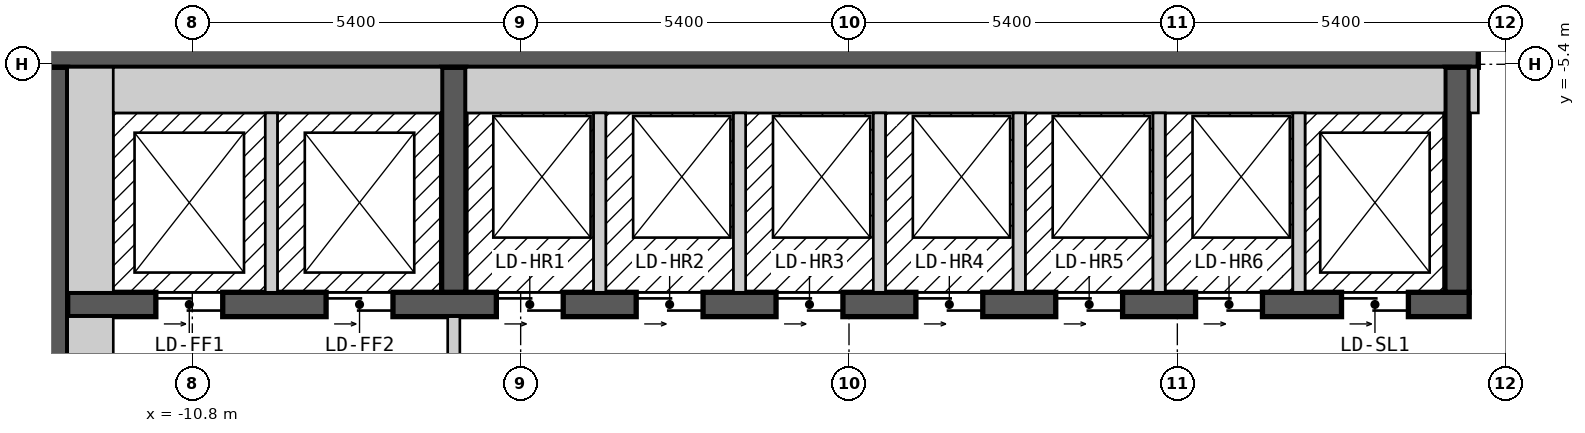
"""IFC4 building model, lengths in metres.
Left out: names, types, materials, properties, quantities, classifications, styles, units other than length and angle.
Written with IfcOpenShell. Run it as: python <this file> out.ifc"""

import sys

from ifc_helpers import new_model, si_unit, direction, frame, frame_2d, origin, place, context, subcontext, project, spatial, rectangle, extrude, element, fill, save


model = new_model("IFC4")
c1 = context("Model", 3, precision=1e-05, world=origin(), true_north=direction((0.0, 1.0)))
c2 = subcontext(c1, "Body", "Model", "MODEL_VIEW")
j1 = project(units=[si_unit("LENGTHUNIT", "METRE"), si_unit("PLANEANGLEUNIT", "RADIAN")], contexts=[c1])
p1 = place(None, origin())
s1 = spatial("IfcSite", under=j1, at=p1, CompositionType="ELEMENT")
p2 = place(p1, origin())
s2 = spatial("IfcBuilding", under=s1, at=p2, CompositionType="ELEMENT")
p3 = place(p2, frame((0.0, 0.0, 202.8)))
s3 = spatial("IfcBuildingStorey", under=s2, at=p3, CompositionType="ELEMENT", Elevation=202.8)
p4 = place(p3, frame((-13.3, -5.225, 0.0), z_axis=(0.0, 0.0, 1.0), x_axis=(1.0, 0.0, 0.0)))
e1 = element("IfcWall", 1, at=p4, inside=s3, PredefinedType="SHEAR", context=c2, shape_type="SweptSolid", body=[
    extrude(rectangle(XDim=26.6, YDim=0.45, at=frame_2d((13.3, 0.0))), origin(), (0.0, 0.0, 1.0), 2.7),
])
p5 = place(p4, frame((23.65, 0.0, 0.0)))
e2 = element("IfcOpeningElement", 2, at=p5, cuts=e1, PredefinedType="OPENING", context=c2, shape_type="SweptSolid", body=[
    extrude(rectangle(XDim=1.2, YDim=2.1, at=frame_2d((0.6, 1.05))), frame((0.0, 0.235, 0.0), z_axis=(0.0, -1.0, 0.0), x_axis=(1.0, 0.0, 0.0)), (0.0, 0.0, 1.0), 0.47),
])
p6 = place(p3, frame((-13.075, -18.55, 0.0), z_axis=(0.0, 0.0, 1.0), x_axis=(0.0, 1.0, 0.0)))
e3 = element("IfcWall", 3, at=p6, inside=s3, PredefinedType="SHEAR", context=c2, shape_type="SweptSolid", body=[
    extrude(rectangle(XDim=13.1, YDim=0.45, at=frame_2d((6.55, 0.0))), origin(), (0.0, 0.0, 1.0), 2.7),
])
p7 = place(p6, frame((4.35, 0.0, 0.0)))
e4 = element("IfcOpeningElement", 4, at=p7, cuts=e3, PredefinedType="OPENING", context=c2, shape_type="SweptSolid", body=[
    extrude(rectangle(XDim=1.2, YDim=2.1, at=frame_2d((0.6, 1.05))), frame((0.0, 0.235, 0.0), z_axis=(0.0, -1.0, 0.0), x_axis=(1.0, 0.0, 0.0)), (0.0, 0.0, 1.0), 0.47),
])
p8 = place(p3, frame((-12.85, -9.35, 0.0), z_axis=(0.0, 0.0, 1.0), x_axis=(1.0, 0.0, 0.0)))
e5 = element("IfcWall", 5, at=p8, inside=s3, PredefinedType="SHEAR", context=c2, shape_type="SweptSolid", body=[
    extrude(rectangle(XDim=23.05, YDim=0.4, at=frame_2d((11.525, 0.0))), origin(), (0.0, 0.0, 1.0), 2.7),
])
p9 = place(p8, frame((1.45, 0.0, 0.0)))
e6 = element("IfcOpeningElement", 6, at=p9, cuts=e5, PredefinedType="OPENING", context=c2, shape_type="SweptSolid", body=[
    extrude(rectangle(XDim=1.1, YDim=2.1, at=frame_2d((0.55, 1.05))), frame((0.0, 0.21, 0.0), z_axis=(0.0, -1.0, 0.0), x_axis=(1.0, 0.0, 0.0)), (0.0, 0.0, 1.0), 0.42),
])
p10 = place(p8, frame((4.25, 0.0, 0.0)))
e7 = element("IfcOpeningElement", 7, at=p10, cuts=e5, PredefinedType="OPENING", context=c2, shape_type="SweptSolid", body=[
    extrude(rectangle(XDim=1.1, YDim=2.1, at=frame_2d((0.55, 1.05))), frame((0.0, 0.21, 0.0), z_axis=(0.0, -1.0, 0.0), x_axis=(1.0, 0.0, 0.0)), (0.0, 0.0, 1.0), 0.42),
])
p11 = place(p8, frame((7.05, 0.0, 0.0)))
e8 = element("IfcOpeningElement", 8, at=p11, cuts=e5, PredefinedType="OPENING", context=c2, shape_type="SweptSolid", body=[
    extrude(rectangle(XDim=1.1, YDim=2.1, at=frame_2d((0.55, 1.05))), frame((0.0, 0.21, 0.0), z_axis=(0.0, -1.0, 0.0), x_axis=(1.0, 0.0, 0.0)), (0.0, 0.0, 1.0), 0.42),
])
p12 = place(p8, frame((9.35, 0.0, 0.0)))
e9 = element("IfcOpeningElement", 9, at=p12, cuts=e5, PredefinedType="OPENING", context=c2, shape_type="SweptSolid", body=[
    extrude(rectangle(XDim=1.1, YDim=2.1, at=frame_2d((0.55, 1.05))), frame((0.0, 0.21, 0.0), z_axis=(0.0, -1.0, 0.0), x_axis=(1.0, 0.0, 0.0)), (0.0, 0.0, 1.0), 0.42),
])
p13 = place(p8, frame((11.65, 0.0, 0.0)))
e10 = element("IfcOpeningElement", 10, at=p13, cuts=e5, PredefinedType="OPENING", context=c2, shape_type="SweptSolid", body=[
    extrude(rectangle(XDim=1.1, YDim=2.1, at=frame_2d((0.55, 1.05))), frame((0.0, 0.21, 0.0), z_axis=(0.0, -1.0, 0.0), x_axis=(1.0, 0.0, 0.0)), (0.0, 0.0, 1.0), 0.42),
])
p14 = place(p8, frame((13.95, 0.0, 0.0)))
e11 = element("IfcOpeningElement", 11, at=p14, cuts=e5, PredefinedType="OPENING", context=c2, shape_type="SweptSolid", body=[
    extrude(rectangle(XDim=1.1, YDim=2.1, at=frame_2d((0.55, 1.05))), frame((0.0, 0.21, 0.0), z_axis=(0.0, -1.0, 0.0), x_axis=(1.0, 0.0, 0.0)), (0.0, 0.0, 1.0), 0.42),
])
p15 = place(p8, frame((16.25, 0.0, 0.0)))
e12 = element("IfcOpeningElement", 12, at=p15, cuts=e5, PredefinedType="OPENING", context=c2, shape_type="SweptSolid", body=[
    extrude(rectangle(XDim=1.1, YDim=2.1, at=frame_2d((0.55, 1.05))), frame((0.0, 0.21, 0.0), z_axis=(0.0, -1.0, 0.0), x_axis=(1.0, 0.0, 0.0)), (0.0, 0.0, 1.0), 0.42),
])
p16 = place(p8, frame((18.55, 0.0, 0.0)))
e13 = element("IfcOpeningElement", 13, at=p16, cuts=e5, PredefinedType="OPENING", context=c2, shape_type="SweptSolid", body=[
    extrude(rectangle(XDim=1.1, YDim=2.1, at=frame_2d((0.55, 1.05))), frame((0.0, 0.21, 0.0), z_axis=(0.0, -1.0, 0.0), x_axis=(1.0, 0.0, 0.0)), (0.0, 0.0, 1.0), 0.42),
])
p17 = place(p8, frame((20.95, 0.0, 0.0)))
e14 = element("IfcOpeningElement", 14, at=p17, cuts=e5, PredefinedType="OPENING", context=c2, shape_type="SweptSolid", body=[
    extrude(rectangle(XDim=1.1, YDim=2.1, at=frame_2d((0.55, 1.05))), frame((0.0, 0.21, 0.0), z_axis=(0.0, -1.0, 0.0), x_axis=(1.0, 0.0, 0.0)), (0.0, 0.0, 1.0), 0.42),
])
for number, where, z_axis, x_axis in (
    (15, (-6.5, -9.15, 0.0), (0.0, 0.0, 1.0), (0.0, 1.0, 0.0)),
    (16, (10.0, -9.15, 0.0), (0.0, 0.0, 1.0), (0.0, 1.0, 0.0)),
):
    element("IfcWall", number, at=place(p3, frame(where, z_axis=z_axis, x_axis=x_axis)), inside=s3, PredefinedType="SHEAR", context=c2, shape_type="SweptSolid", body=[
        extrude(rectangle(XDim=3.7, YDim=0.4, at=frame_2d((1.85, 0.0))), origin(), (0.0, 0.0, 1.0), 2.7),
    ])
p18 = place(p3, frame((-12.475, -13.0, 0.0), z_axis=(0.0, 0.0, 1.0), x_axis=(0.0, 1.0, 0.0)))
e17 = element("IfcWall", 17, at=p18, inside=s3, PredefinedType="PARTITIONING", context=c2, shape_type="SweptSolid", body=[
    extrude(rectangle(XDim=3.45, YDim=0.75, at=frame_2d((1.725, 0.0))), origin(), (0.0, 0.0, 1.0), 2.7),
])
p19 = place(p3, frame((-12.475, -9.15, 0.0), z_axis=(0.0, 0.0, 1.0), x_axis=(0.0, 1.0, 0.0)))
e18 = element("IfcWall", 18, at=p19, inside=s3, PredefinedType="SOLIDWALL", context=c2, shape_type="SweptSolid", body=[
    extrude(rectangle(XDim=3.7, YDim=0.75, at=frame_2d((1.85, 0.0))), origin(), (0.0, 0.0, 1.0), 2.7),
])
p20 = place(p3, frame((-12.1, -5.825, 0.0), z_axis=(0.0, 0.0, 1.0), x_axis=(1.0, 0.0, 0.0)))
e19 = element("IfcWall", 19, at=p20, inside=s3, PredefinedType="SOLIDWALL", context=c2, shape_type="SweptSolid", body=[
    extrude(rectangle(XDim=5.4, YDim=0.75, at=frame_2d((2.7, 0.0))), origin(), (0.0, 0.0, 1.0), 2.7),
])
p21 = place(p3, frame((-9.5, -9.15, 0.0), z_axis=(0.0, 0.0, 1.0), x_axis=(0.0, 1.0, 0.0)))
e20 = element("IfcWall", 20, at=p21, inside=s3, PredefinedType="SOLIDWALL", context=c2, shape_type="SweptSolid", body=[
    extrude(rectangle(XDim=2.95, YDim=0.2, at=frame_2d((1.475, 0.0))), origin(), (0.0, 0.0, 1.0), 2.7),
])
p22 = place(p3, frame((-6.5, -14.45, 0.0), z_axis=(0.0, 0.0, 1.0), x_axis=(0.0, 1.0, 0.0)))
e21 = element("IfcWall", 21, at=p22, inside=s3, PredefinedType="PARTITIONING", context=c2, shape_type="SweptSolid", body=[
    extrude(rectangle(XDim=4.9, YDim=0.2, at=frame_2d((2.45, 0.0))), origin(), (0.0, 0.0, 1.0), 2.7),
])
p23 = place(p22, frame((3.15, 0.0, 0.0), z_axis=(0.0, 0.0, 1.0), x_axis=(-1.0, 0.0, 0.0)))
e22 = element("IfcOpeningElement", 22, at=p23, cuts=e21, PredefinedType="OPENING", context=c2, shape_type="SweptSolid", body=[
    extrude(rectangle(XDim=1.4, YDim=2.1, at=frame_2d((0.7, 1.05))), frame((0.0, 0.11, 0.0), z_axis=(0.0, -1.0, 0.0), x_axis=(1.0, 0.0, 0.0)), (0.0, 0.0, 1.0), 0.22),
])
p24 = place(p3, frame((-6.3, -5.825, 0.0), z_axis=(0.0, 0.0, 1.0), x_axis=(1.0, 0.0, 0.0)))
e23 = element("IfcWall", 23, at=p24, inside=s3, PredefinedType="SOLIDWALL", context=c2, shape_type="SweptSolid", body=[
    extrude(rectangle(XDim=16.1, YDim=0.75, at=frame_2d((8.05, 0.0))), origin(), (0.0, 0.0, 1.0), 2.7),
])
for number, where, z_axis, x_axis in (
    (24, (-4.1, -9.15, 0.0), (0.0, 0.0, 1.0), (0.0, 1.0, 0.0)),
    (25, (-1.8, -9.15, 0.0), (0.0, 0.0, 1.0), (0.0, 1.0, 0.0)),
    (26, (0.5, -9.15, 0.0), (0.0, 0.0, 1.0), (0.0, 1.0, 0.0)),
    (27, (2.8, -9.15, 0.0), (0.0, 0.0, 1.0), (0.0, 1.0, 0.0)),
    (28, (5.1, -9.15, 0.0), (0.0, 0.0, 1.0), (0.0, 1.0, 0.0)),
    (29, (7.4, -9.15, 0.0), (0.0, 0.0, 1.0), (0.0, 1.0, 0.0)),
):
    element("IfcWall", number, at=place(p3, frame(where, z_axis=z_axis, x_axis=x_axis)), inside=s3, PredefinedType="SOLIDWALL", context=c2, shape_type="SweptSolid", body=[
        extrude(rectangle(XDim=2.95, YDim=0.2, at=frame_2d((1.475, 0.0))), origin(), (0.0, 0.0, 1.0), 2.7),
    ])
p25 = place(p3, frame((10.275, -6.2, 0.0), z_axis=(0.0, 0.0, 1.0), x_axis=(0.0, 1.0, 0.0)))
e30 = element("IfcWall", 30, at=p25, inside=s3, PredefinedType="PARTITIONING", context=c2, shape_type="SweptSolid", body=[
    extrude(rectangle(XDim=0.75, YDim=0.15, at=frame_2d((0.375, 0.0))), origin(), (0.0, 0.0, 1.0), 2.7),
])
p26 = place(p9, origin())
e31 = element("IfcDoor", 31, at=p26, inside=s3, OperationType="DOUBLE_DOOR_SLIDING", PredefinedType="DOOR", context=c2, shape_type="SweptSolid", body=[
    extrude(rectangle(XDim=1.1, YDim=2.1, at=frame_2d((0.55, 1.05))), frame((0.0, 0.025, 0.0), z_axis=(0.0, -1.0, 0.0), x_axis=(1.0, 0.0, 0.0)), (0.0, 0.0, 1.0), 0.05),
])
fill(e6, e31)
p27 = place(p10, origin())
e32 = element("IfcDoor", 32, at=p27, inside=s3, OperationType="DOUBLE_DOOR_SLIDING", PredefinedType="DOOR", context=c2, shape_type="SweptSolid", body=[
    extrude(rectangle(XDim=1.1, YDim=2.1, at=frame_2d((0.55, 1.05))), frame((0.0, 0.025, 0.0), z_axis=(0.0, -1.0, 0.0), x_axis=(1.0, 0.0, 0.0)), (0.0, 0.0, 1.0), 0.05),
])
fill(e7, e32)
p28 = place(p11, origin())
e33 = element("IfcDoor", 33, at=p28, inside=s3, OperationType="DOUBLE_DOOR_SLIDING", PredefinedType="DOOR", context=c2, shape_type="SweptSolid", body=[
    extrude(rectangle(XDim=1.1, YDim=2.1, at=frame_2d((0.55, 1.05))), frame((0.0, 0.025, 0.0), z_axis=(0.0, -1.0, 0.0), x_axis=(1.0, 0.0, 0.0)), (0.0, 0.0, 1.0), 0.05),
])
fill(e8, e33)
p29 = place(p12, origin())
e34 = element("IfcDoor", 34, at=p29, inside=s3, OperationType="DOUBLE_DOOR_SLIDING", PredefinedType="DOOR", context=c2, shape_type="SweptSolid", body=[
    extrude(rectangle(XDim=1.1, YDim=2.1, at=frame_2d((0.55, 1.05))), frame((0.0, 0.025, 0.0), z_axis=(0.0, -1.0, 0.0), x_axis=(1.0, 0.0, 0.0)), (0.0, 0.0, 1.0), 0.05),
])
fill(e9, e34)
p30 = place(p13, origin())
e35 = element("IfcDoor", 35, at=p30, inside=s3, OperationType="DOUBLE_DOOR_SLIDING", PredefinedType="DOOR", context=c2, shape_type="SweptSolid", body=[
    extrude(rectangle(XDim=1.1, YDim=2.1, at=frame_2d((0.55, 1.05))), frame((0.0, 0.025, 0.0), z_axis=(0.0, -1.0, 0.0), x_axis=(1.0, 0.0, 0.0)), (0.0, 0.0, 1.0), 0.05),
])
fill(e10, e35)
p31 = place(p14, origin())
e36 = element("IfcDoor", 36, at=p31, inside=s3, OperationType="DOUBLE_DOOR_SLIDING", PredefinedType="DOOR", context=c2, shape_type="SweptSolid", body=[
    extrude(rectangle(XDim=1.1, YDim=2.1, at=frame_2d((0.55, 1.05))), frame((0.0, 0.025, 0.0), z_axis=(0.0, -1.0, 0.0), x_axis=(1.0, 0.0, 0.0)), (0.0, 0.0, 1.0), 0.05),
])
fill(e11, e36)
p32 = place(p15, origin())
e37 = element("IfcDoor", 37, at=p32, inside=s3, OperationType="DOUBLE_DOOR_SLIDING", PredefinedType="DOOR", context=c2, shape_type="SweptSolid", body=[
    extrude(rectangle(XDim=1.1, YDim=2.1, at=frame_2d((0.55, 1.05))), frame((0.0, 0.025, 0.0), z_axis=(0.0, -1.0, 0.0), x_axis=(1.0, 0.0, 0.0)), (0.0, 0.0, 1.0), 0.05),
])
fill(e12, e37)
p33 = place(p16, origin())
e38 = element("IfcDoor", 38, at=p33, inside=s3, OperationType="DOUBLE_DOOR_SLIDING", PredefinedType="DOOR", context=c2, shape_type="SweptSolid", body=[
    extrude(rectangle(XDim=1.1, YDim=2.1, at=frame_2d((0.55, 1.05))), frame((0.0, 0.025, 0.0), z_axis=(0.0, -1.0, 0.0), x_axis=(1.0, 0.0, 0.0)), (0.0, 0.0, 1.0), 0.05),
])
fill(e13, e38)
p34 = place(p17, origin())
e39 = element("IfcDoor", 39, at=p34, inside=s3, OperationType="DOUBLE_DOOR_SLIDING", PredefinedType="DOOR", context=c2, shape_type="SweptSolid", body=[
    extrude(rectangle(XDim=1.1, YDim=2.1, at=frame_2d((0.55, 1.05))), frame((0.0, 0.025, 0.0), z_axis=(0.0, -1.0, 0.0), x_axis=(1.0, 0.0, 0.0)), (0.0, 0.0, 1.0), 0.05),
])
fill(e14, e39)
p35 = place(p5, origin())
e40 = element("IfcDoor", 40, at=p35, inside=s3, OperationType="DOUBLE_DOOR_SINGLE_SWING", PredefinedType="DOOR", context=c2, shape_type="SweptSolid", body=[
    extrude(rectangle(XDim=1.2, YDim=2.1, at=frame_2d((0.6, 1.05))), frame((0.0, 0.025, 0.0), z_axis=(0.0, -1.0, 0.0), x_axis=(1.0, 0.0, 0.0)), (0.0, 0.0, 1.0), 0.05),
])
fill(e2, e40)
save(model, sys.argv[1])
